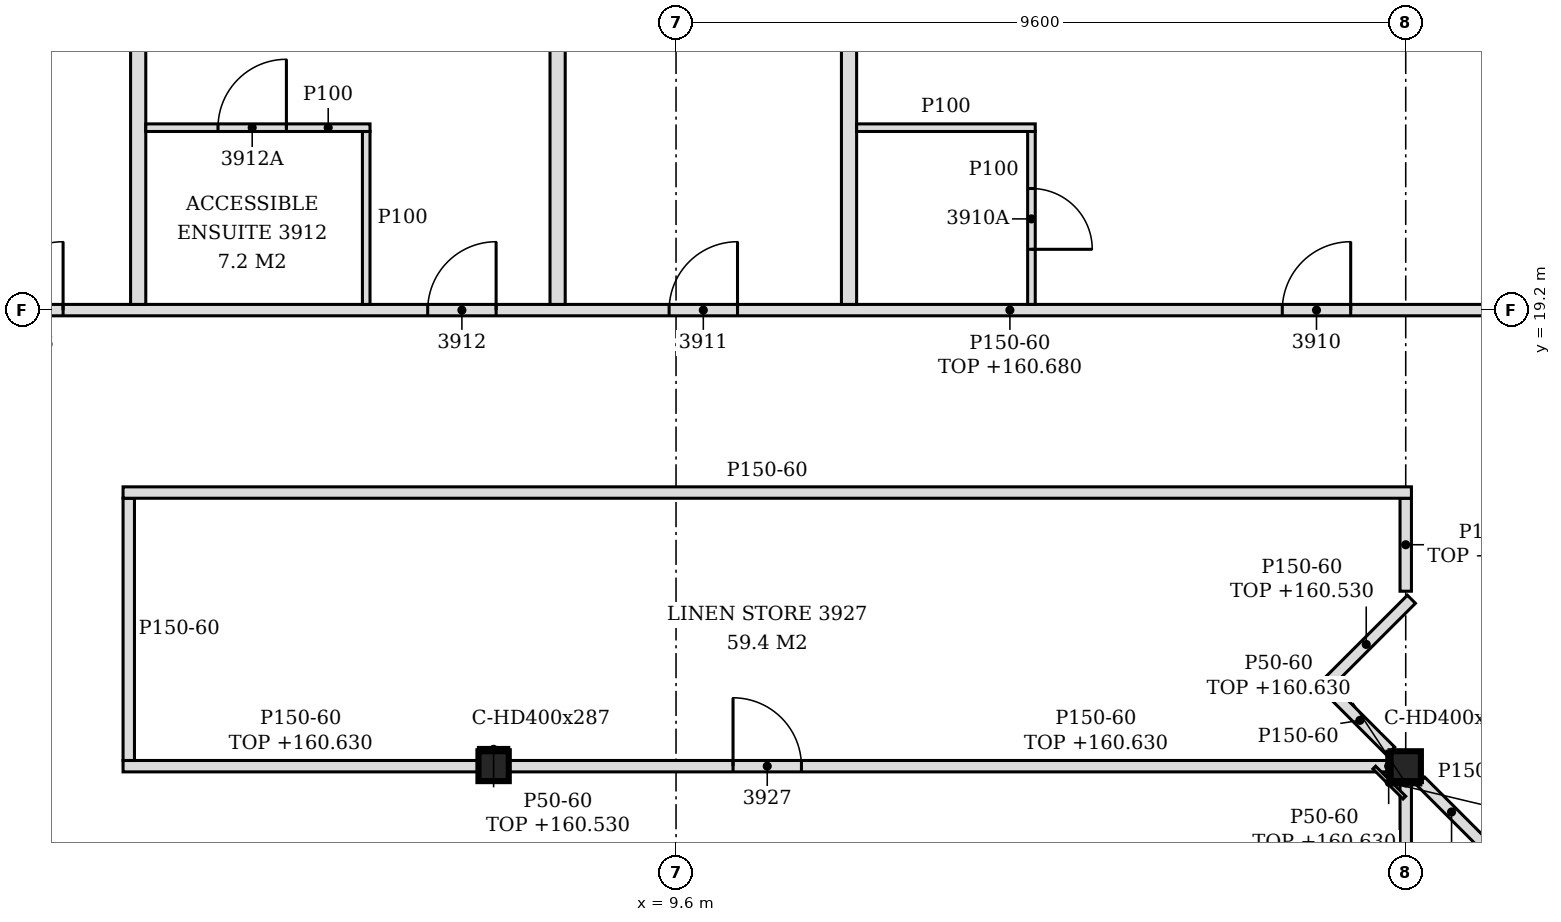
"""IFC4 building model, lengths in metres.
Left out: names, types, materials, properties, quantities, classifications, styles, units other than length and angle.
Written with IfcOpenShell. Run it as: python <this file> out.ifc"""

import sys

from ifc_helpers import new_model, si_unit, direction, frame, frame_2d, origin, origin_2d, place, context, subcontext, project, spatial, polyline, rectangle, i_section, outline, extrude, element, fill, save


model = new_model("IFC4")
c1 = context("Model", 3, precision=1e-05, world=origin(), true_north=direction((0.0, 1.0)))
c2 = subcontext(c1, "Body", "Model", "MODEL_VIEW")
j1 = project(units=[si_unit("LENGTHUNIT", "METRE"), si_unit("PLANEANGLEUNIT", "RADIAN")], contexts=[c1])
p1 = place(None, origin())
s1 = spatial("IfcSite", under=j1, at=p1, CompositionType="ELEMENT")
p2 = place(p1, origin())
s2 = spatial("IfcBuilding", under=s1, at=p2, CompositionType="ELEMENT")
p3 = place(p2, frame((0.0, 0.0, 157.8)))
s3 = spatial("IfcBuildingStorey", under=s2, at=p3, CompositionType="ELEMENT", Elevation=157.8)
for number, where, z_axis, x_axis in (
    (1, (7.2, 13.2, -0.15), (0.0, 0.0, 1.0), (1.0, 0.0, 0.0)),
    (2, (19.2, 13.2, -0.15), (0.0, 0.0, 1.0), (1.0, 0.0, 0.0)),
):
    element("IfcColumn", number, at=place(p3, frame(where, z_axis=z_axis, x_axis=x_axis)), inside=s3, PredefinedType="COLUMN", context=c2, shape_type="SweptSolid", body=[
        extrude(i_section(OverallWidth=0.399, OverallDepth=0.393, WebThickness=0.023, FlangeThickness=0.037, FilletRadius=0.015, at=origin_2d()), origin(), (0.0, 0.0, 1.0), 3.6),
    ])
p4 = place(p3, frame((19.2, 2.596, 0.0), z_axis=(0.0, 0.0, 1.0), x_axis=(0.0, 1.0, 0.0)))
e3 = element("IfcWall", 3, at=p4, inside=s3, PredefinedType="PARTITIONING", context=c2, shape_type="SweptSolid", body=[
    extrude(rectangle(XDim=10.407, YDim=0.15, at=frame_2d((5.204, 0.0))), origin(), (0.0, 0.0, 1.0), 2.83),
])
p5 = place(p4, frame((0.553, 0.0, 0.0)))
e4 = element("IfcOpeningElement", 4, at=p5, cuts=e3, PredefinedType="OPENING", context=c2, shape_type="SweptSolid", body=[
    extrude(rectangle(XDim=0.9, YDim=2.1, at=frame_2d((0.45, 1.05))), frame((0.0, 0.085, 0.0), z_axis=(0.0, -1.0, 0.0), x_axis=(1.0, 0.0, 0.0)), (0.0, 0.0, 1.0), 0.17),
])
p6 = place(p3, frame((20.208, 12.086, 0.0), z_axis=(0.0, 0.0, 1.0), x_axis=(0.706756381459, 0.707457007363, 0.0)))
e5 = element("IfcWall", 5, at=p6, inside=s3, PredefinedType="PARTITIONING", context=c2, shape_type="SweptSolid", body=[
    extrude(rectangle(XDim=1.394, YDim=0.15, at=frame_2d((0.697, 0.0))), origin(), (0.0, 0.0, 1.0), 3.45),
])
p7 = place(p3, frame((20.208, 12.192, 0.0), z_axis=(0.0, 0.0, 1.0), x_axis=(-0.70721334539, 0.707000200921, 0.0)))
e6 = element("IfcWall", 6, at=p7, inside=s3, PredefinedType="PARTITIONING", context=c2, shape_type="SweptSolid", body=[
    extrude(rectangle(XDim=1.146, YDim=0.15, at=frame_2d((0.573, 0.0))), origin(), (0.0, 0.0, 1.0), 3.45),
])
p8 = place(p3, frame((2.325, 13.2, 0.0), z_axis=(0.0, 0.0, 1.0), x_axis=(1.0, 0.0, 0.0)))
e7 = element("IfcWall", 7, at=p8, inside=s3, PredefinedType="PARTITIONING", context=c2, shape_type="SweptSolid", body=[
    extrude(rectangle(XDim=4.676, YDim=0.15, at=frame_2d((2.338, 0.0))), origin(), (0.0, 0.0, 1.0), 2.83),
])
p9 = place(p3, frame((7.399, 13.2, 0.0), z_axis=(0.0, 0.0, 1.0), x_axis=(1.0, 0.0, 0.0)))
e8 = element("IfcWall", 8, at=p9, inside=s3, PredefinedType="PARTITIONING", context=c2, shape_type="SweptSolid", body=[
    extrude(rectangle(XDim=11.601, YDim=0.15, at=frame_2d((5.801, 0.0))), origin(), (0.0, 0.0, 1.0), 2.83),
])
p10 = place(p9, frame((2.95, 0.0, 0.0)))
e9 = element("IfcOpeningElement", 9, at=p10, cuts=e8, PredefinedType="OPENING", context=c2, shape_type="SweptSolid", body=[
    extrude(rectangle(XDim=0.9, YDim=2.1, at=frame_2d((0.45, 1.05))), frame((0.0, 0.085, 0.0), z_axis=(0.0, -1.0, 0.0), x_axis=(1.0, 0.0, 0.0)), (0.0, 0.0, 1.0), 0.17),
])
p11 = place(p3, frame((2.4, 13.275, 0.0), z_axis=(0.0, 0.0, 1.0), x_axis=(0.0, 1.0, 0.0)))
e10 = element("IfcWall", 10, at=p11, inside=s3, PredefinedType="PARTITIONING", context=c2, shape_type="SweptSolid", body=[
    extrude(outline(polyline([(0.0, 0.0), (3.45, 0.0), (3.45, 3.45), (0.075, 3.45), (0.073, 2.83), (0.0, 2.83), (0.0, 0.0)])), frame((0.0, 0.075, 0.0), z_axis=(0.0, -1.0, 0.0), x_axis=(1.0, 0.0, 0.0)), (0.0, 0.0, 1.0), 0.15),
])
p12 = place(p3, frame((19.002, 13.398, 0.0), z_axis=(0.0, 0.0, 1.0), x_axis=(-0.707000200921, 0.70721334539, 0.0)))
e11 = element("IfcWall", 11, at=p12, inside=s3, PredefinedType="PARTITIONING", context=c2, shape_type="SweptSolid", body=[
    extrude(rectangle(XDim=1.146, YDim=0.15, at=frame_2d((0.573, 0.0))), origin(), (0.0, 0.0, 1.0), 3.45),
])
p13 = place(p3, frame((18.086, 14.208, 0.0), z_axis=(0.0, 0.0, 1.0), x_axis=(0.70739723372, 0.706816209298, 0.0)))
e12 = element("IfcWall", 12, at=p13, inside=s3, PredefinedType="PARTITIONING", context=c2, shape_type="SweptSolid", body=[
    extrude(rectangle(XDim=1.681, YDim=0.15, at=frame_2d((0.84, 0.0))), origin(), (0.0, 0.0, 1.0), 2.73),
])
p14 = place(p3, frame((19.2, 15.502, 0.0), z_axis=(0.0, 0.0, 1.0), x_axis=(0.0, 1.0, 0.0)))
e13 = element("IfcWall", 13, at=p14, inside=s3, PredefinedType="PARTITIONING", context=c2, shape_type="SweptSolid", body=[
    extrude(rectangle(XDim=1.223, YDim=0.15, at=frame_2d((0.612, 0.0))), origin(), (0.0, 0.0, 1.0), 2.73),
])
p15 = place(p3, frame((2.325, 16.8, 0.0), z_axis=(0.0, 0.0, 1.0), x_axis=(1.0, 0.0, 0.0)))
e14 = element("IfcWall", 14, at=p15, inside=s3, PredefinedType="PARTITIONING", context=c2, shape_type="SweptSolid", body=[
    extrude(outline(polyline([(0.0, 0.0), (16.95, 0.0), (16.95, 2.73), (16.725, 2.73), (16.723, 3.45), (5.025, 3.45), (5.023, 2.73), (4.725, 2.73), (4.723, 3.45), (0.0, 3.45), (0.0, 0.0)])), frame((0.0, 0.075, 0.0), z_axis=(0.0, -1.0, 0.0), x_axis=(1.0, 0.0, 0.0)), (0.0, 0.0, 1.0), 0.15),
])
p16 = place(p3, frame((-8.421, 19.2, 0.0), z_axis=(0.0, 0.0, 1.0), x_axis=(1.0, 0.0, 0.0)))
e15 = element("IfcWall", 15, at=p16, inside=s3, PredefinedType="PARTITIONING", context=c2, shape_type="SweptSolid", body=[
    extrude(outline(polyline([(0.0, 0.0), (31.242, 0.0), (31.242, 2.88), (27.771, 2.88), (27.769, 2.73), (27.471, 2.73), (27.469, 2.88), (15.771, 2.88), (15.769, 2.73), (15.471, 2.73), (15.469, 2.88), (3.771, 2.88), (3.769, 2.73), (3.471, 2.73), (3.469, 2.88), (0.0, 2.88), (0.0, 0.0)])), frame((0.0, 0.075, 0.0), z_axis=(0.0, -1.0, 0.0), x_axis=(1.0, 0.0, 0.0)), (0.0, 0.0, 1.0), 0.15),
])
p17 = place(p16, frame((25.997, 0.0, 0.0)))
e16 = element("IfcOpeningElement", 16, at=p17, cuts=e15, PredefinedType="OPENING", context=c2, shape_type="SweptSolid", body=[
    extrude(rectangle(XDim=0.9, YDim=2.1, at=frame_2d((0.45, 1.05))), frame((0.0, 0.085, 0.0), z_axis=(0.0, -1.0, 0.0), x_axis=(1.0, 0.0, 0.0)), (0.0, 0.0, 1.0), 0.17),
])
p18 = place(p16, frame((17.93, 0.0, 0.0)))
e17 = element("IfcOpeningElement", 17, at=p18, cuts=e15, PredefinedType="OPENING", context=c2, shape_type="SweptSolid", body=[
    extrude(rectangle(XDim=0.9, YDim=2.1, at=frame_2d((0.45, 1.05))), frame((0.0, 0.085, 0.0), z_axis=(0.0, -1.0, 0.0), x_axis=(1.0, 0.0, 0.0)), (0.0, 0.0, 1.0), 0.17),
])
p19 = place(p16, frame((14.754, 0.0, 0.0)))
e18 = element("IfcOpeningElement", 18, at=p19, cuts=e15, PredefinedType="OPENING", context=c2, shape_type="SweptSolid", body=[
    extrude(rectangle(XDim=0.9, YDim=2.1, at=frame_2d((0.45, 1.05))), frame((0.0, 0.085, 0.0), z_axis=(0.0, -1.0, 0.0), x_axis=(1.0, 0.0, 0.0)), (0.0, 0.0, 1.0), 0.17),
])
p20 = place(p16, frame((9.057, 0.0, 0.0)))
e19 = element("IfcOpeningElement", 19, at=p20, cuts=e15, PredefinedType="OPENING", context=c2, shape_type="SweptSolid", body=[
    extrude(rectangle(XDim=0.9, YDim=2.1, at=frame_2d((0.45, 1.05))), frame((0.0, 0.085, 0.0), z_axis=(0.0, -1.0, 0.0), x_axis=(1.0, 0.0, 0.0)), (0.0, 0.0, 1.0), 0.17),
])
p21 = place(p16, frame((2.907, 0.0, 0.0)))
e20 = element("IfcOpeningElement", 20, at=p21, cuts=e15, PredefinedType="OPENING", context=c2, shape_type="SweptSolid", body=[
    extrude(rectangle(XDim=0.9, YDim=2.1, at=frame_2d((0.45, 1.05))), frame((0.0, 0.085, 0.0), z_axis=(0.0, -1.0, 0.0), x_axis=(1.0, 0.0, 0.0)), (0.0, 0.0, 1.0), 0.17),
])
p22 = place(p3, frame((2.524, 19.275, 0.0), z_axis=(0.0, 0.0, 1.0), x_axis=(0.0, 1.0, 0.0)))
e21 = element("IfcWall", 21, at=p22, inside=s3, PredefinedType="PARTITIONING", context=c2, shape_type="SweptSolid", body=[
    extrude(outline(polyline([(0.0, 0.0), (8.325, 0.0), (8.325, 3.45), (4.83, 3.45), (4.828, 2.88), (4.62, 2.88), (4.618, 3.45), (0.03, 3.45), (0.028, 2.88), (0.0, 2.88), (0.0, 0.0)])), frame((0.0, 0.1, 0.0), z_axis=(0.0, -1.0, 0.0), x_axis=(1.0, 0.0, 0.0)), (0.0, 0.0, 1.0), 0.2),
])
p23 = place(p3, frame((5.524, 19.275, 0.0), z_axis=(0.0, 0.0, 1.0), x_axis=(0.0, 1.0, 0.0)))
e22 = element("IfcWall", 22, at=p23, inside=s3, PredefinedType="PARTITIONING", context=c2, shape_type="SweptSolid", body=[
    extrude(outline(polyline([(0.0, 0.0), (2.275, 0.0), (2.275, 3.45), (0.03, 3.45), (0.028, 2.88), (0.0, 2.88), (0.0, 0.0)])), frame((0.0, 0.05, 0.0), z_axis=(0.0, -1.0, 0.0), x_axis=(1.0, 0.0, 0.0)), (0.0, 0.0, 1.0), 0.1),
])
p24 = place(p3, frame((8.042, 19.275, 0.0), z_axis=(0.0, 0.0, 1.0), x_axis=(0.0, 1.0, 0.0)))
e23 = element("IfcWall", 23, at=p24, inside=s3, PredefinedType="PARTITIONING", context=c2, shape_type="SweptSolid", body=[
    extrude(outline(polyline([(0.0, 0.0), (9.145, 0.0), (9.145, 3.45), (8.775, 3.45), (8.773, 2.93), (8.475, 2.93), (8.473, 3.45), (4.83, 3.45), (4.828, 2.88), (4.62, 2.88), (4.618, 3.45), (0.03, 3.45), (0.028, 2.88), (0.0, 2.88), (0.0, 0.0)])), frame((0.0, 0.1, 0.0), z_axis=(0.0, -1.0, 0.0), x_axis=(1.0, 0.0, 0.0)), (0.0, 0.0, 1.0), 0.2),
])
p25 = place(p3, frame((11.876, 19.275, 0.0), z_axis=(0.0, 0.0, 1.0), x_axis=(0.0, 1.0, 0.0)))
e24 = element("IfcWall", 24, at=p25, inside=s3, PredefinedType="PARTITIONING", context=c2, shape_type="SweptSolid", body=[
    extrude(outline(polyline([(0.0, 0.0), (8.325, 0.0), (8.325, 3.45), (4.83, 3.45), (4.828, 2.88), (4.62, 2.88), (4.618, 3.45), (0.03, 3.45), (0.028, 2.88), (0.0, 2.88), (0.0, 0.0)])), frame((0.0, 0.1, 0.0), z_axis=(0.0, -1.0, 0.0), x_axis=(1.0, 0.0, 0.0)), (0.0, 0.0, 1.0), 0.2),
])
p26 = place(p3, frame((14.276, 19.275, 0.0), z_axis=(0.0, 0.0, 1.0), x_axis=(0.0, 1.0, 0.0)))
e25 = element("IfcWall", 25, at=p26, inside=s3, PredefinedType="PARTITIONING", context=c2, shape_type="SweptSolid", body=[
    extrude(outline(polyline([(0.0, 0.0), (2.275, 0.0), (2.275, 3.45), (0.03, 3.45), (0.028, 2.88), (0.0, 2.88), (0.0, 0.0)])), frame((0.0, 0.05, 0.0), z_axis=(0.0, -1.0, 0.0), x_axis=(1.0, 0.0, 0.0)), (0.0, 0.0, 1.0), 0.1),
])
p27 = place(p26, frame((0.725, 0.0, 0.0)))
e26 = element("IfcOpeningElement", 26, at=p27, cuts=e25, PredefinedType="OPENING", context=c2, shape_type="SweptSolid", body=[
    extrude(rectangle(XDim=0.8, YDim=2.1, at=frame_2d((0.4, 1.05))), frame((0.0, 0.06, 0.0), z_axis=(0.0, -1.0, 0.0), x_axis=(1.0, 0.0, 0.0)), (0.0, 0.0, 1.0), 0.12),
])
p28 = place(p3, frame((2.624, 21.6, 0.0), z_axis=(0.0, 0.0, 1.0), x_axis=(1.0, 0.0, 0.0)))
e27 = element("IfcWall", 27, at=p28, inside=s3, PredefinedType="PARTITIONING", context=c2, shape_type="SweptSolid", body=[
    extrude(rectangle(XDim=2.95, YDim=0.1, at=frame_2d((1.475, 0.0))), origin(), (0.0, 0.0, 1.0), 3.45),
])
p29 = place(p28, frame((0.95, 0.0, 0.0)))
e28 = element("IfcOpeningElement", 28, at=p29, cuts=e27, PredefinedType="OPENING", context=c2, shape_type="SweptSolid", body=[
    extrude(rectangle(XDim=0.9, YDim=2.1, at=frame_2d((0.45, 1.05))), frame((0.0, 0.06, 0.0), z_axis=(0.0, -1.0, 0.0), x_axis=(1.0, 0.0, 0.0)), (0.0, 0.0, 1.0), 0.12),
])
p30 = place(p3, frame((11.976, 21.6, 0.0), z_axis=(0.0, 0.0, 1.0), x_axis=(1.0, 0.0, 0.0)))
e29 = element("IfcWall", 29, at=p30, inside=s3, PredefinedType="PARTITIONING", context=c2, shape_type="SweptSolid", body=[
    extrude(rectangle(XDim=2.35, YDim=0.1, at=frame_2d((1.175, 0.0))), origin(), (0.0, 0.0, 1.0), 3.45),
])
p31 = place(p3, frame((18.976, 13.003, 0.0), z_axis=(0.0, 0.0, 1.0), x_axis=(0.0, 1.0, 0.0)))
e30 = element("IfcWall", 30, at=p31, inside=s3, PredefinedType="PARTITIONING", context=c2, shape_type="SweptSolid", body=[
    extrude(rectangle(XDim=0.393, YDim=0.05, at=frame_2d((0.197, 0.0))), origin(), (0.0, 0.0, 1.0), 2.83),
])
p32 = place(p3, frame((19.182, 12.786, 0.0), z_axis=(0.0, 0.0, 1.0), x_axis=(-0.707106781187, 0.707106781187, 0.0)))
e31 = element("IfcWall", 31, at=p32, inside=s3, PredefinedType="PARTITIONING", context=c2, shape_type="SweptSolid", body=[
    extrude(rectangle(XDim=0.56, YDim=0.05, at=frame_2d((0.28, 0.0))), origin(), (0.0, 0.0, 1.0), 2.83),
])
p33 = place(p3, frame((7.0, 13.421, 0.0), z_axis=(0.0, 0.0, 1.0), x_axis=(1.0, 0.0, 0.0)))
e32 = element("IfcWall", 32, at=p33, inside=s3, PredefinedType="PARTITIONING", context=c2, shape_type="SweptSolid", body=[
    extrude(rectangle(XDim=0.399, YDim=0.05, at=frame_2d((0.199, 0.0))), origin(), (0.0, 0.0, 1.0), 2.73),
])
p34 = place(p3, frame((19.0, 12.979, 0.0), z_axis=(0.0, 0.0, 1.0), x_axis=(1.0, 0.0, 0.0)))
e33 = element("IfcWall", 33, at=p34, inside=s3, PredefinedType="PARTITIONING", context=c2, shape_type="SweptSolid", body=[
    extrude(rectangle(XDim=0.399, YDim=0.05, at=frame_2d((0.199, 0.0))), origin(), (0.0, 0.0, 1.0), 2.83),
])
p35 = place(p17, origin())
e34 = element("IfcDoor", 34, at=p35, inside=s3, OperationType="SINGLE_SWING_RIGHT", PredefinedType="DOOR", context=c2, shape_type="SweptSolid", body=[
    extrude(rectangle(XDim=0.9, YDim=2.1, at=frame_2d((0.45, 1.05))), frame((0.0, 0.025, 0.0), z_axis=(0.0, -1.0, 0.0), x_axis=(1.0, 0.0, 0.0)), (0.0, 0.0, 1.0), 0.05),
])
fill(e16, e34)
p36 = place(p27, frame((0.8, 0.0, 0.0), z_axis=(0.0, 0.0, 1.0), x_axis=(-1.0, 0.0, 0.0)))
e35 = element("IfcDoor", 35, at=p36, inside=s3, OperationType="SINGLE_SWING_RIGHT", PredefinedType="DOOR", context=c2, shape_type="SweptSolid", body=[
    extrude(rectangle(XDim=0.8, YDim=2.1, at=frame_2d((0.4, 1.05))), frame((0.0, 0.025, 0.0), z_axis=(0.0, -1.0, 0.0), x_axis=(1.0, 0.0, 0.0)), (0.0, 0.0, 1.0), 0.05),
])
fill(e26, e35)
p37 = place(p18, origin())
e36 = element("IfcDoor", 36, at=p37, inside=s3, OperationType="SINGLE_SWING_RIGHT", PredefinedType="DOOR", context=c2, shape_type="SweptSolid", body=[
    extrude(rectangle(XDim=0.9, YDim=2.1, at=frame_2d((0.45, 1.05))), frame((0.0, 0.025, 0.0), z_axis=(0.0, -1.0, 0.0), x_axis=(1.0, 0.0, 0.0)), (0.0, 0.0, 1.0), 0.05),
])
fill(e17, e36)
p38 = place(p19, origin())
e37 = element("IfcDoor", 37, at=p38, inside=s3, OperationType="SINGLE_SWING_RIGHT", PredefinedType="DOOR", context=c2, shape_type="SweptSolid", body=[
    extrude(rectangle(XDim=0.9, YDim=2.1, at=frame_2d((0.45, 1.05))), frame((0.0, 0.025, 0.0), z_axis=(0.0, -1.0, 0.0), x_axis=(1.0, 0.0, 0.0)), (0.0, 0.0, 1.0), 0.05),
])
fill(e18, e37)
p39 = place(p29, origin())
e38 = element("IfcDoor", 38, at=p39, inside=s3, OperationType="SINGLE_SWING_RIGHT", PredefinedType="DOOR", context=c2, shape_type="SweptSolid", body=[
    extrude(rectangle(XDim=0.9, YDim=2.1, at=frame_2d((0.45, 1.05))), frame((0.0, 0.025, 0.0), z_axis=(0.0, -1.0, 0.0), x_axis=(1.0, 0.0, 0.0)), (0.0, 0.0, 1.0), 0.05),
])
fill(e28, e38)
p40 = place(p20, origin())
e39 = element("IfcDoor", 39, at=p40, inside=s3, OperationType="SINGLE_SWING_RIGHT", PredefinedType="DOOR", context=c2, shape_type="SweptSolid", body=[
    extrude(rectangle(XDim=0.9, YDim=2.1, at=frame_2d((0.45, 1.05))), frame((0.0, 0.025, 0.0), z_axis=(0.0, -1.0, 0.0), x_axis=(1.0, 0.0, 0.0)), (0.0, 0.0, 1.0), 0.05),
])
fill(e19, e39)
p41 = place(p10, origin())
e40 = element("IfcDoor", 40, at=p41, inside=s3, OperationType="SINGLE_SWING_LEFT", PredefinedType="DOOR", context=c2, shape_type="SweptSolid", body=[
    extrude(rectangle(XDim=0.9, YDim=2.1, at=frame_2d((0.45, 1.05))), frame((0.0, 0.025, 0.0), z_axis=(0.0, -1.0, 0.0), x_axis=(1.0, 0.0, 0.0)), (0.0, 0.0, 1.0), 0.05),
])
fill(e9, e40)
save(model, sys.argv[1])
